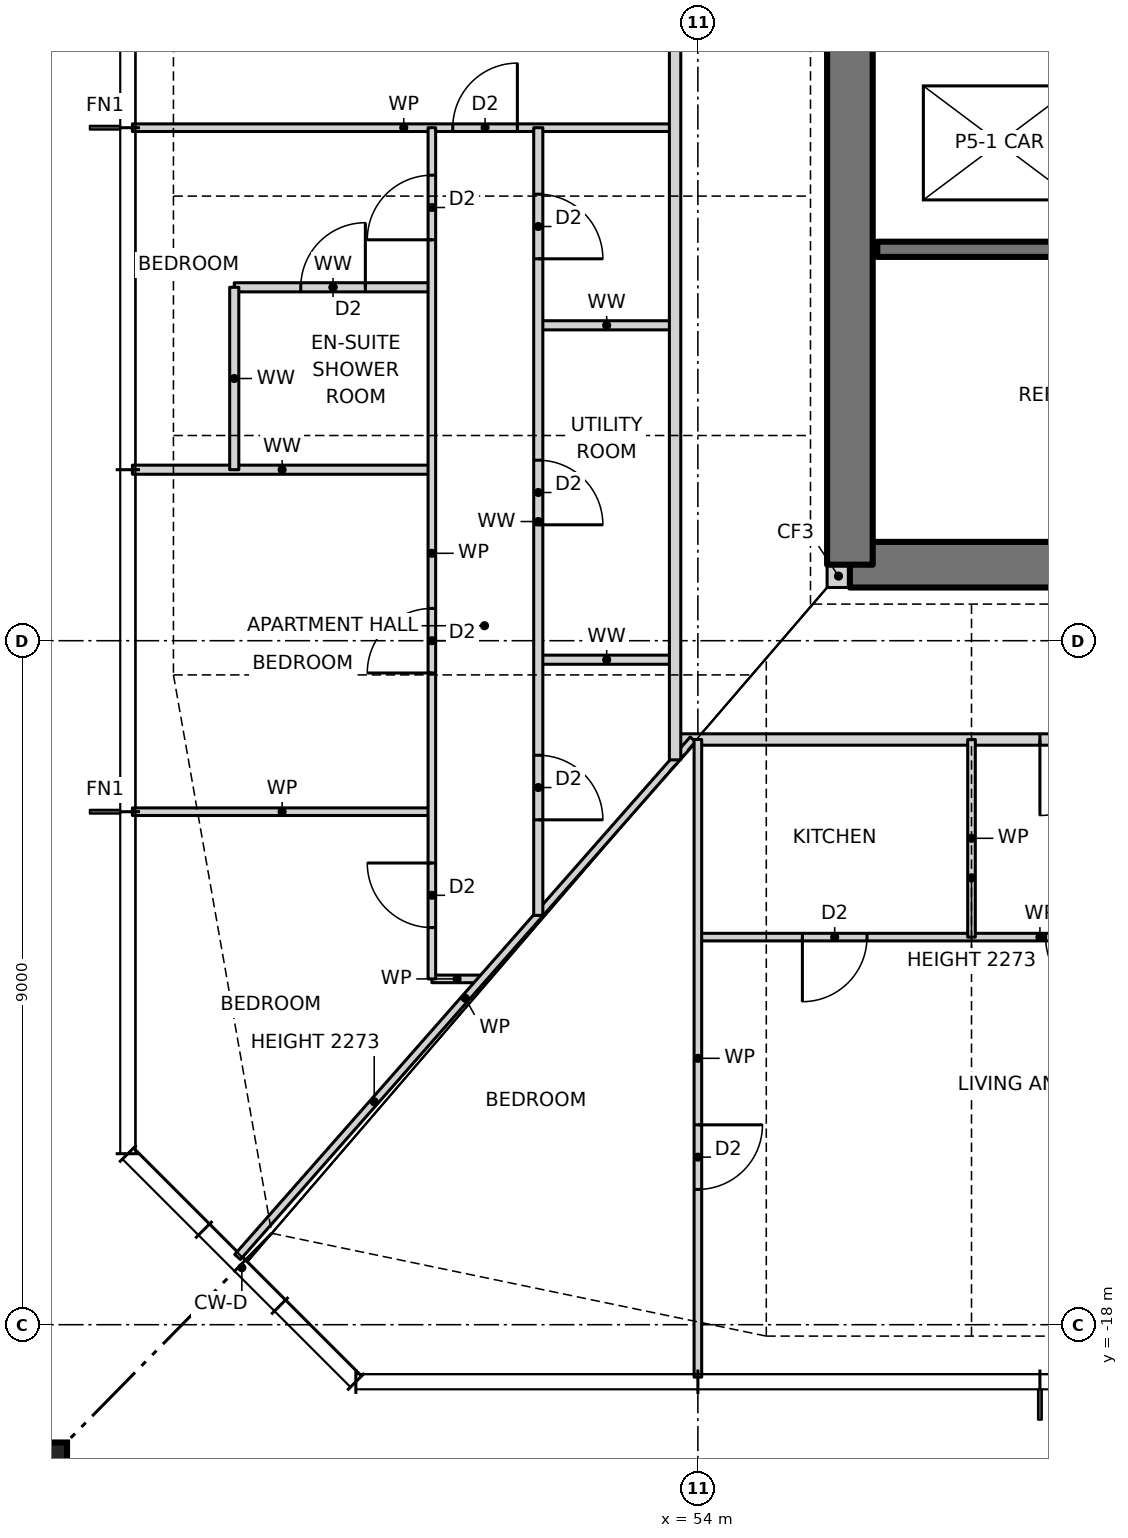
"""IFC4 building model, lengths in metres.
Left out: names, types, materials, properties, quantities, classifications, styles, units other than length and angle.
Written with IfcOpenShell. Run it as: python <this file> out.ifc"""

import sys

from ifc_helpers import new_model, si_unit, direction, frame, frame_2d, origin, origin_2d, place, context, subcontext, project, spatial, rectangle, hollow_rectangle, extrude, element, fill, save


model = new_model("IFC4")
c1 = context("Model", 3, precision=1e-05, world=origin(), true_north=direction((0.0, 1.0)))
c2 = subcontext(c1, "Body", "Model", "MODEL_VIEW")
j1 = project(units=[si_unit("LENGTHUNIT", "METRE"), si_unit("PLANEANGLEUNIT", "RADIAN")], contexts=[c1])
p1 = place(None, origin())
s1 = spatial("IfcSite", under=j1, at=p1, CompositionType="ELEMENT")
p2 = place(p1, origin())
s2 = spatial("IfcBuilding", under=s1, at=p2, CompositionType="ELEMENT")
p3 = place(p2, frame((0.0, 0.0, 71.0)))
s3 = spatial("IfcBuildingStorey", under=s2, at=p3, CompositionType="ELEMENT", Elevation=71.0)
p4 = place(p3, frame((45.1, -20.15, 0.0), z_axis=(0.0, 0.0, 1.0), x_axis=(1.0, 0.0, 0.0)))
e1 = element("IfcColumn", 1, at=p4, inside=s3, PredefinedType="COLUMN", context=c2, shape_type="SweptSolid", body=[
    extrude(hollow_rectangle(XDim=1.2, YDim=1.2, WallThickness=0.07, at=origin_2d()), origin(), (0.0, 0.0, 1.0), 3.5),
])
p5 = place(p3, frame((55.7, -8.15, 0.0), z_axis=(0.0, 0.0, 1.0), x_axis=(1.0, 0.0, 0.0)))
e2 = element("IfcWall", 2, at=p5, inside=s3, PredefinedType="SOLIDWALL", context=c2, shape_type="SweptSolid", body=[
    extrude(rectangle(XDim=0.3, YDim=0.3, at=frame_2d((0.15, 0.0))), origin(), (0.0, 0.0, 1.0), 3.5),
])
p6 = place(p3, frame((56.0, -8.0, 0.0), z_axis=(0.0, 0.0, 1.0), x_axis=(1.0, 0.0, 0.0)))
e3 = element("IfcWall", 3, at=p6, inside=s3, PredefinedType="SHEAR", context=c2, shape_type="SweptSolid", body=[
    extrude(rectangle(XDim=14.0, YDim=0.6, at=frame_2d((7.0, 0.0))), origin(), (0.0, 0.0, 1.0), 3.5),
])
p7 = place(p6, frame((2.7, 0.0, 0.0)))
e4 = element("IfcOpeningElement", 4, at=p7, cuts=e3, PredefinedType="OPENING", context=c2, shape_type="SweptSolid", body=[
    extrude(rectangle(XDim=0.9, YDim=2.1, at=frame_2d((0.45, 1.05))), frame((0.0, 0.31, 0.0), z_axis=(0.0, -1.0, 0.0), x_axis=(1.0, 0.0, 0.0)), (0.0, 0.0, 1.0), 0.62),
])
p8 = place(p6, frame((7.7, 0.0, 0.0)))
e5 = element("IfcOpeningElement", 5, at=p8, cuts=e3, PredefinedType="OPENING", context=c2, shape_type="SweptSolid", body=[
    extrude(rectangle(XDim=0.9, YDim=2.1, at=frame_2d((0.45, 1.05))), frame((0.0, 0.31, 0.0), z_axis=(0.0, -1.0, 0.0), x_axis=(1.0, 0.0, 0.0)), (0.0, 0.0, 1.0), 0.62),
])
p9 = place(p3, frame((56.0, 8.0, 0.0), z_axis=(0.0, 0.0, 1.0), x_axis=(0.0, -1.0, 0.0)))
e6 = element("IfcWall", 6, at=p9, inside=s3, PredefinedType="SHEAR", context=c2, shape_type="SweptSolid", body=[
    extrude(rectangle(XDim=16.0, YDim=0.6, at=frame_2d((8.0, 0.0))), origin(), (0.0, 0.0, 1.0), 3.5),
])
p10 = place(p9, frame((7.5, 0.0, 0.0)))
e7 = element("IfcOpeningElement", 7, at=p10, cuts=e6, PredefinedType="OPENING", context=c2, shape_type="SweptSolid", body=[
    extrude(rectangle(XDim=1.0, YDim=2.1, at=frame_2d((0.5, 1.05))), frame((0.0, 0.31, 0.0), z_axis=(0.0, -1.0, 0.0), x_axis=(1.0, 0.0, 0.0)), (0.0, 0.0, 1.0), 0.62),
])
p11 = place(p3, frame((50.5, -13.45, 0.0), z_axis=(0.0, 0.0, 1.0), x_axis=(1.0, 0.0, 0.0)))
e8 = element("IfcWall", 8, at=p11, inside=s3, PredefinedType="PARTITIONING", context=c2, shape_type="SweptSolid", body=[
    extrude(rectangle(XDim=0.664, YDim=0.1, at=frame_2d((0.332, 0.0))), origin(), (0.0, 0.0, 1.0), 3.2),
])
p12 = place(p3, frame((54.0, -12.9, 0.0), z_axis=(0.0, 0.0, 1.0), x_axis=(1.0, 0.0, 0.0)))
e9 = element("IfcWall", 9, at=p12, inside=s3, PredefinedType="PARTITIONING", context=c2, shape_type="SweptSolid", body=[
    extrude(rectangle(XDim=9.0, YDim=0.1, at=frame_2d((4.5, 0.0))), origin(), (0.0, 0.0, 1.0), 3.2),
])
p13 = place(p12, frame((1.375, 0.0, 0.0)))
e10 = element("IfcOpeningElement", 10, at=p13, cuts=e9, PredefinedType="OPENING", context=c2, shape_type="SweptSolid", body=[
    extrude(rectangle(XDim=0.85, YDim=2.1, at=frame_2d((0.425, 1.05))), frame((0.0, 0.06, 0.0), z_axis=(0.0, -1.0, 0.0), x_axis=(1.0, 0.0, 0.0)), (0.0, 0.0, 1.0), 0.12),
])
p14 = place(p12, frame((4.575, 0.0, 0.0)))
e11 = element("IfcOpeningElement", 11, at=p14, cuts=e9, PredefinedType="OPENING", context=c2, shape_type="SweptSolid", body=[
    extrude(rectangle(XDim=0.85, YDim=2.1, at=frame_2d((0.425, 1.05))), frame((0.0, 0.06, 0.0), z_axis=(0.0, -1.0, 0.0), x_axis=(1.0, 0.0, 0.0)), (0.0, 0.0, 1.0), 0.12),
])
p15 = place(p3, frame((46.56, -11.25, 0.0), z_axis=(0.0, 0.0, 1.0), x_axis=(1.0, 0.0, 0.0)))
e12 = element("IfcWall", 12, at=p15, inside=s3, PredefinedType="PARTITIONING", context=c2, shape_type="SweptSolid", body=[
    extrude(rectangle(XDim=3.94, YDim=0.1, at=frame_2d((1.97, 0.0))), origin(), (0.0, 0.0, 1.0), 3.2),
])
p16 = place(p3, frame((53.7, -10.3, 0.0), z_axis=(0.0, 0.0, 1.0), x_axis=(1.0, 0.0, 0.0)))
e13 = element("IfcWall", 13, at=p16, inside=s3, PredefinedType="PARTITIONING", context=c2, shape_type="SweptSolid", body=[
    extrude(rectangle(XDim=18.6, YDim=0.15, at=frame_2d((9.3, 0.0))), origin(), (0.0, 0.0, 1.0), 3.2),
])
p17 = place(p16, frame((4.8, 0.0, 0.0)))
e14 = element("IfcOpeningElement", 14, at=p17, cuts=e13, PredefinedType="OPENING", context=c2, shape_type="SweptSolid", body=[
    extrude(rectangle(XDim=1.0, YDim=2.1, at=frame_2d((0.5, 1.05))), frame((0.0, 0.085, 0.0), z_axis=(0.0, -1.0, 0.0), x_axis=(1.0, 0.0, 0.0)), (0.0, 0.0, 1.0), 0.17),
])
p18 = place(p16, frame((10.2, 0.0, 0.0)))
e15 = element("IfcOpeningElement", 15, at=p18, cuts=e13, PredefinedType="OPENING", context=c2, shape_type="SweptSolid", body=[
    extrude(rectangle(XDim=1.0, YDim=2.1, at=frame_2d((0.5, 1.05))), frame((0.0, 0.085, 0.0), z_axis=(0.0, -1.0, 0.0), x_axis=(1.0, 0.0, 0.0)), (0.0, 0.0, 1.0), 0.17),
])
p19 = place(p3, frame((51.9, -9.25, 0.0), z_axis=(0.0, 0.0, 1.0), x_axis=(1.0, 0.0, 0.0)))
e16 = element("IfcWall", 16, at=p19, inside=s3, PredefinedType="PARTITIONING", context=c2, shape_type="SweptSolid", body=[
    extrude(rectangle(XDim=1.8, YDim=0.12, at=frame_2d((0.9, 0.0))), origin(), (0.0, 0.0, 1.0), 3.2),
])
p20 = place(p3, frame((46.56, -6.75, 0.0), z_axis=(0.0, 0.0, 1.0), x_axis=(1.0, 0.0, 0.0)))
e17 = element("IfcWall", 17, at=p20, inside=s3, PredefinedType="PARTITIONING", context=c2, shape_type="SweptSolid", body=[
    extrude(rectangle(XDim=3.94, YDim=0.12, at=frame_2d((1.97, 0.0))), origin(), (0.0, 0.0, 1.0), 3.2),
])
p21 = place(p3, frame((51.9, -4.85, 0.0), z_axis=(0.0, 0.0, 1.0), x_axis=(1.0, 0.0, 0.0)))
e18 = element("IfcWall", 18, at=p21, inside=s3, PredefinedType="PARTITIONING", context=c2, shape_type="SweptSolid", body=[
    extrude(rectangle(XDim=1.8, YDim=0.12, at=frame_2d((0.9, 0.0))), origin(), (0.0, 0.0, 1.0), 3.2),
])
p22 = place(p3, frame((47.9, -4.35, 0.0), z_axis=(0.0, 0.0, 1.0), x_axis=(1.0, 0.0, 0.0)))
e19 = element("IfcWall", 19, at=p22, inside=s3, PredefinedType="PARTITIONING", context=c2, shape_type="SweptSolid", body=[
    extrude(rectangle(XDim=2.6, YDim=0.12, at=frame_2d((1.3, 0.0))), origin(), (0.0, 0.0, 1.0), 3.2),
])
p23 = place(p22, frame((0.875, 0.0, 0.0)))
e20 = element("IfcOpeningElement", 20, at=p23, cuts=e19, PredefinedType="OPENING", context=c2, shape_type="SweptSolid", body=[
    extrude(rectangle(XDim=0.85, YDim=2.1, at=frame_2d((0.425, 1.05))), frame((0.0, 0.07, 0.0), z_axis=(0.0, -1.0, 0.0), x_axis=(1.0, 0.0, 0.0)), (0.0, 0.0, 1.0), 0.14),
])
p24 = place(p3, frame((56.36, -3.85, 0.0), z_axis=(0.0, 0.0, 1.0), x_axis=(1.0, 0.0, 0.0)))
e21 = element("IfcWall", 21, at=p24, inside=s3, PredefinedType="SOLIDWALL", context=c2, shape_type="SweptSolid", body=[
    extrude(rectangle(XDim=9.94, YDim=0.2, at=frame_2d((4.97, 0.0))), origin(), (0.0, 0.0, 1.0), 3.5),
])
p25 = place(p3, frame((46.56, -2.25, 0.0), z_axis=(0.0, 0.0, 1.0), x_axis=(1.0, 0.0, 0.0)))
e22 = element("IfcWall", 22, at=p25, inside=s3, PredefinedType="PARTITIONING", context=c2, shape_type="SweptSolid", body=[
    extrude(rectangle(XDim=7.14, YDim=0.1, at=frame_2d((3.57, 0.0))), origin(), (0.0, 0.0, 1.0), 3.2),
])
p26 = place(p25, frame((4.215, 0.0, 0.0)))
e23 = element("IfcOpeningElement", 23, at=p26, cuts=e22, PredefinedType="OPENING", context=c2, shape_type="SweptSolid", body=[
    extrude(rectangle(XDim=0.85, YDim=2.1, at=frame_2d((0.425, 1.05))), frame((0.0, 0.06, 0.0), z_axis=(0.0, -1.0, 0.0), x_axis=(1.0, 0.0, 0.0)), (0.0, 0.0, 1.0), 0.12),
])
p27 = place(p3, frame((47.944, -17.109, 0.0), z_axis=(0.0, 0.0, 1.0), x_axis=(0.660638210404, 0.750704439146, 0.0)))
e24 = element("IfcWall", 24, at=p27, inside=s3, PredefinedType="PARTITIONING", context=c2, shape_type="SweptSolid", body=[
    extrude(rectangle(XDim=9.07, YDim=0.1, at=frame_2d((4.535, 0.0))), origin(), (0.0, 0.0, 1.0), 2.273),
])
p28 = place(p3, frame((57.6, -12.9, 0.0), z_axis=(0.0, 0.0, 1.0), x_axis=(0.0, 1.0, 0.0)))
e25 = element("IfcWall", 25, at=p28, inside=s3, PredefinedType="PARTITIONING", context=c2, shape_type="SweptSolid", body=[
    extrude(rectangle(XDim=2.6, YDim=0.1, at=frame_2d((1.3, 0.0))), origin(), (0.0, 0.0, 1.0), 2.273),
])
p29 = place(p3, frame((54.0, -18.69, 0.0), z_axis=(0.0, 0.0, 1.0), x_axis=(0.0, 1.0, 0.0)))
e26 = element("IfcWall", 26, at=p29, inside=s3, PredefinedType="PARTITIONING", context=c2, shape_type="SweptSolid", body=[
    extrude(rectangle(XDim=8.39, YDim=0.1, at=frame_2d((4.195, 0.0))), origin(), (0.0, 0.0, 1.0), 3.2),
])
p30 = place(p29, frame((2.47, 0.0, 0.0)))
e27 = element("IfcOpeningElement", 27, at=p30, cuts=e26, PredefinedType="OPENING", context=c2, shape_type="SweptSolid", body=[
    extrude(rectangle(XDim=0.85, YDim=2.1, at=frame_2d((0.425, 1.05))), frame((0.0, 0.06, 0.0), z_axis=(0.0, -1.0, 0.0), x_axis=(1.0, 0.0, 0.0)), (0.0, 0.0, 1.0), 0.12),
])
p31 = place(p3, frame((53.7, -10.568, 0.0), z_axis=(0.0, 0.0, 1.0), x_axis=(0.0, 1.0, 0.0)))
e28 = element("IfcWall", 28, at=p31, inside=s3, PredefinedType="PARTITIONING", context=c2, shape_type="SweptSolid", body=[
    extrude(rectangle(XDim=21.136, YDim=0.15, at=frame_2d((10.568, 0.0))), origin(), (0.0, 0.0, 1.0), 3.2),
])
p32 = place(p31, frame((16.318, 0.0, 0.0)))
e29 = element("IfcOpeningElement", 29, at=p32, cuts=e28, PredefinedType="OPENING", context=c2, shape_type="SweptSolid", body=[
    extrude(rectangle(XDim=1.0, YDim=2.1, at=frame_2d((0.5, 1.05))), frame((0.0, 0.085, 0.0), z_axis=(0.0, -1.0, 0.0), x_axis=(1.0, 0.0, 0.0)), (0.0, 0.0, 1.0), 0.17),
])
p33 = place(p31, frame((10.918, 0.0, 0.0)))
e30 = element("IfcOpeningElement", 30, at=p33, cuts=e28, PredefinedType="OPENING", context=c2, shape_type="SweptSolid", body=[
    extrude(rectangle(XDim=1.0, YDim=2.1, at=frame_2d((0.5, 1.05))), frame((0.0, 0.085, 0.0), z_axis=(0.0, -1.0, 0.0), x_axis=(1.0, 0.0, 0.0)), (0.0, 0.0, 1.0), 0.17),
])
p34 = place(p3, frame((51.9, -12.614, 0.0), z_axis=(0.0, 0.0, 1.0), x_axis=(0.0, 1.0, 0.0)))
e31 = element("IfcWall", 31, at=p34, inside=s3, PredefinedType="PARTITIONING", context=c2, shape_type="SweptSolid", body=[
    extrude(rectangle(XDim=10.364, YDim=0.12, at=frame_2d((5.182, 0.0))), origin(), (0.0, 0.0, 1.0), 3.2),
])
p35 = place(p34, frame((8.639, 0.0, 0.0)))
e32 = element("IfcOpeningElement", 32, at=p35, cuts=e31, PredefinedType="OPENING", context=c2, shape_type="SweptSolid", body=[
    extrude(rectangle(XDim=0.85, YDim=2.1, at=frame_2d((0.425, 1.05))), frame((0.0, 0.07, 0.0), z_axis=(0.0, -1.0, 0.0), x_axis=(1.0, 0.0, 0.0)), (0.0, 0.0, 1.0), 0.14),
])
p36 = place(p34, frame((5.139, 0.0, 0.0)))
e33 = element("IfcOpeningElement", 33, at=p36, cuts=e31, PredefinedType="OPENING", context=c2, shape_type="SweptSolid", body=[
    extrude(rectangle(XDim=0.85, YDim=2.1, at=frame_2d((0.425, 1.05))), frame((0.0, 0.07, 0.0), z_axis=(0.0, -1.0, 0.0), x_axis=(1.0, 0.0, 0.0)), (0.0, 0.0, 1.0), 0.14),
])
p37 = place(p34, frame((1.257, 0.0, 0.0)))
e34 = element("IfcOpeningElement", 34, at=p37, cuts=e31, PredefinedType="OPENING", context=c2, shape_type="SweptSolid", body=[
    extrude(rectangle(XDim=0.85, YDim=2.1, at=frame_2d((0.425, 1.05))), frame((0.0, 0.07, 0.0), z_axis=(0.0, -1.0, 0.0), x_axis=(1.0, 0.0, 0.0)), (0.0, 0.0, 1.0), 0.14),
])
p38 = place(p3, frame((50.5, -13.45, 0.0), z_axis=(0.0, 0.0, 1.0), x_axis=(0.0, 1.0, 0.0)))
e35 = element("IfcWall", 35, at=p38, inside=s3, PredefinedType="PARTITIONING", context=c2, shape_type="SweptSolid", body=[
    extrude(rectangle(XDim=11.2, YDim=0.1, at=frame_2d((5.6, 0.0))), origin(), (0.0, 0.0, 1.0), 3.2),
])
p39 = place(p38, frame((9.725, 0.0, 0.0)))
e36 = element("IfcOpeningElement", 36, at=p39, cuts=e35, PredefinedType="OPENING", context=c2, shape_type="SweptSolid", body=[
    extrude(rectangle(XDim=0.85, YDim=2.1, at=frame_2d((0.425, 1.05))), frame((0.0, 0.06, 0.0), z_axis=(0.0, -1.0, 0.0), x_axis=(1.0, 0.0, 0.0)), (0.0, 0.0, 1.0), 0.12),
])
p40 = place(p38, frame((4.025, 0.0, 0.0)))
e37 = element("IfcOpeningElement", 37, at=p40, cuts=e35, PredefinedType="OPENING", context=c2, shape_type="SweptSolid", body=[
    extrude(rectangle(XDim=0.85, YDim=2.1, at=frame_2d((0.425, 1.05))), frame((0.0, 0.06, 0.0), z_axis=(0.0, -1.0, 0.0), x_axis=(1.0, 0.0, 0.0)), (0.0, 0.0, 1.0), 0.12),
])
p41 = place(p38, frame((0.675, 0.0, 0.0)))
e38 = element("IfcOpeningElement", 38, at=p41, cuts=e35, PredefinedType="OPENING", context=c2, shape_type="SweptSolid", body=[
    extrude(rectangle(XDim=0.85, YDim=2.1, at=frame_2d((0.425, 1.05))), frame((0.0, 0.06, 0.0), z_axis=(0.0, -1.0, 0.0), x_axis=(1.0, 0.0, 0.0)), (0.0, 0.0, 1.0), 0.12),
])
p42 = place(p3, frame((47.9, -6.75, 0.0), z_axis=(0.0, 0.0, 1.0), x_axis=(0.0, 1.0, 0.0)))
e39 = element("IfcWall", 39, at=p42, inside=s3, PredefinedType="PARTITIONING", context=c2, shape_type="SweptSolid", body=[
    extrude(rectangle(XDim=2.4, YDim=0.12, at=frame_2d((1.2, 0.0))), origin(), (0.0, 0.0, 1.0), 3.2),
])
p43 = place(p13, frame((0.85, 0.0, 0.0), z_axis=(0.0, 0.0, 1.0), x_axis=(-1.0, 0.0, 0.0)))
e40 = element("IfcDoor", 40, at=p43, inside=s3, OperationType="SINGLE_SWING_RIGHT", PredefinedType="DOOR", context=c2, shape_type="SweptSolid", body=[
    extrude(rectangle(XDim=0.85, YDim=2.1, at=frame_2d((0.425, 1.05))), frame((0.0, 0.025, 0.0), z_axis=(0.0, -1.0, 0.0), x_axis=(1.0, 0.0, 0.0)), (0.0, 0.0, 1.0), 0.05),
])
fill(e10, e40)
p44 = place(p17, frame((1.0, 0.0, 0.0), z_axis=(0.0, 0.0, 1.0), x_axis=(-1.0, 0.0, 0.0)))
e41 = element("IfcDoor", 41, at=p44, inside=s3, OperationType="SINGLE_SWING_RIGHT", PredefinedType="DOOR", context=c2, shape_type="SweptSolid", body=[
    extrude(rectangle(XDim=1.0, YDim=2.1, at=frame_2d((0.5, 1.05))), frame((0.0, 0.025, 0.0), z_axis=(0.0, -1.0, 0.0), x_axis=(1.0, 0.0, 0.0)), (0.0, 0.0, 1.0), 0.05),
])
fill(e14, e41)
p45 = place(p14, frame((0.85, 0.0, 0.0), z_axis=(0.0, 0.0, 1.0), x_axis=(-1.0, 0.0, 0.0)))
e42 = element("IfcDoor", 42, at=p45, inside=s3, OperationType="SINGLE_SWING_LEFT", PredefinedType="DOOR", context=c2, shape_type="SweptSolid", body=[
    extrude(rectangle(XDim=0.85, YDim=2.1, at=frame_2d((0.425, 1.05))), frame((0.0, 0.025, 0.0), z_axis=(0.0, -1.0, 0.0), x_axis=(1.0, 0.0, 0.0)), (0.0, 0.0, 1.0), 0.05),
])
fill(e11, e42)
p46 = place(p30, frame((0.85, 0.0, 0.0), z_axis=(0.0, 0.0, 1.0), x_axis=(-1.0, 0.0, 0.0)))
e43 = element("IfcDoor", 43, at=p46, inside=s3, OperationType="SINGLE_SWING_LEFT", PredefinedType="DOOR", context=c2, shape_type="SweptSolid", body=[
    extrude(rectangle(XDim=0.85, YDim=2.1, at=frame_2d((0.425, 1.05))), frame((0.0, 0.025, 0.0), z_axis=(0.0, -1.0, 0.0), x_axis=(1.0, 0.0, 0.0)), (0.0, 0.0, 1.0), 0.05),
])
fill(e27, e43)
p47 = place(p26, origin())
e44 = element("IfcDoor", 44, at=p47, inside=s3, OperationType="SINGLE_SWING_RIGHT", PredefinedType="DOOR", context=c2, shape_type="SweptSolid", body=[
    extrude(rectangle(XDim=0.85, YDim=2.1, at=frame_2d((0.425, 1.05))), frame((0.0, 0.025, 0.0), z_axis=(0.0, -1.0, 0.0), x_axis=(1.0, 0.0, 0.0)), (0.0, 0.0, 1.0), 0.05),
])
fill(e23, e44)
p48 = place(p23, origin())
e45 = element("IfcDoor", 45, at=p48, inside=s3, OperationType="SINGLE_SWING_RIGHT", PredefinedType="DOOR", context=c2, shape_type="SweptSolid", body=[
    extrude(rectangle(XDim=0.85, YDim=2.1, at=frame_2d((0.425, 1.05))), frame((0.0, 0.025, 0.0), z_axis=(0.0, -1.0, 0.0), x_axis=(1.0, 0.0, 0.0)), (0.0, 0.0, 1.0), 0.05),
])
fill(e20, e45)
p49 = place(p39, origin())
e46 = element("IfcDoor", 46, at=p49, inside=s3, OperationType="SINGLE_SWING_LEFT", PredefinedType="DOOR", context=c2, shape_type="SweptSolid", body=[
    extrude(rectangle(XDim=0.85, YDim=2.1, at=frame_2d((0.425, 1.05))), frame((0.0, 0.025, 0.0), z_axis=(0.0, -1.0, 0.0), x_axis=(1.0, 0.0, 0.0)), (0.0, 0.0, 1.0), 0.05),
])
fill(e36, e46)
p50 = place(p40, origin())
e47 = element("IfcDoor", 47, at=p50, inside=s3, OperationType="SINGLE_SWING_LEFT", PredefinedType="DOOR", context=c2, shape_type="SweptSolid", body=[
    extrude(rectangle(XDim=0.85, YDim=2.1, at=frame_2d((0.425, 1.05))), frame((0.0, 0.025, 0.0), z_axis=(0.0, -1.0, 0.0), x_axis=(1.0, 0.0, 0.0)), (0.0, 0.0, 1.0), 0.05),
])
fill(e37, e47)
p51 = place(p41, origin())
e48 = element("IfcDoor", 48, at=p51, inside=s3, OperationType="SINGLE_SWING_RIGHT", PredefinedType="DOOR", context=c2, shape_type="SweptSolid", body=[
    extrude(rectangle(XDim=0.85, YDim=2.1, at=frame_2d((0.425, 1.05))), frame((0.0, 0.025, 0.0), z_axis=(0.0, -1.0, 0.0), x_axis=(1.0, 0.0, 0.0)), (0.0, 0.0, 1.0), 0.05),
])
fill(e38, e48)
p52 = place(p35, frame((0.85, 0.0, 0.0), z_axis=(0.0, 0.0, 1.0), x_axis=(-1.0, 0.0, 0.0)))
e49 = element("IfcDoor", 49, at=p52, inside=s3, OperationType="SINGLE_SWING_RIGHT", PredefinedType="DOOR", context=c2, shape_type="SweptSolid", body=[
    extrude(rectangle(XDim=0.85, YDim=2.1, at=frame_2d((0.425, 1.05))), frame((0.0, 0.025, 0.0), z_axis=(0.0, -1.0, 0.0), x_axis=(1.0, 0.0, 0.0)), (0.0, 0.0, 1.0), 0.05),
])
fill(e32, e49)
p53 = place(p36, frame((0.85, 0.0, 0.0), z_axis=(0.0, 0.0, 1.0), x_axis=(-1.0, 0.0, 0.0)))
e50 = element("IfcDoor", 50, at=p53, inside=s3, OperationType="SINGLE_SWING_RIGHT", PredefinedType="DOOR", context=c2, shape_type="SweptSolid", body=[
    extrude(rectangle(XDim=0.85, YDim=2.1, at=frame_2d((0.425, 1.05))), frame((0.0, 0.025, 0.0), z_axis=(0.0, -1.0, 0.0), x_axis=(1.0, 0.0, 0.0)), (0.0, 0.0, 1.0), 0.05),
])
fill(e33, e50)
p54 = place(p37, frame((0.85, 0.0, 0.0), z_axis=(0.0, 0.0, 1.0), x_axis=(-1.0, 0.0, 0.0)))
e51 = element("IfcDoor", 51, at=p54, inside=s3, OperationType="SINGLE_SWING_RIGHT", PredefinedType="DOOR", context=c2, shape_type="SweptSolid", body=[
    extrude(rectangle(XDim=0.85, YDim=2.1, at=frame_2d((0.425, 1.05))), frame((0.0, 0.025, 0.0), z_axis=(0.0, -1.0, 0.0), x_axis=(1.0, 0.0, 0.0)), (0.0, 0.0, 1.0), 0.05),
])
fill(e34, e51)
save(model, sys.argv[1])
